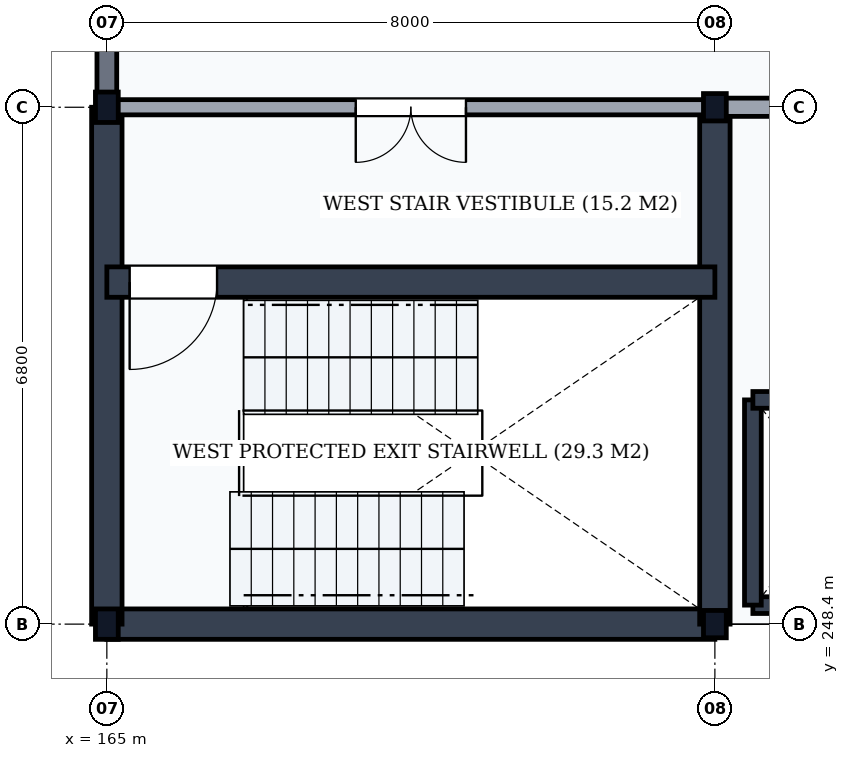
"""IFC4 building model, lengths in metres.
Left out: names, types, materials, properties, quantities, classifications, styles, units other than length and angle.
Written with IfcOpenShell. Run it as: python <this file> out.ifc"""

import sys

from ifc_helpers import new_model, si_unit, direction, frame, frame_2d, origin, origin_2d, place, context, subcontext, project, spatial, rectangle, i_section, extrude, element, fill, save


model = new_model("IFC4")
c1 = context("Model", 3, precision=1e-05, world=origin(), true_north=direction((0.0, 1.0)))
c2 = subcontext(c1, "Body", "Model", "MODEL_VIEW")
j1 = project(units=[si_unit("LENGTHUNIT", "METRE"), si_unit("PLANEANGLEUNIT", "RADIAN")], contexts=[c1])
p1 = place(None, origin())
s1 = spatial("IfcSite", under=j1, at=p1, CompositionType="ELEMENT")
p2 = place(p1, origin())
s2 = spatial("IfcBuilding", under=s1, at=p2, CompositionType="ELEMENT")
p3 = place(p2, frame((0.0, 0.0, 56.1)))
s3 = spatial("IfcBuildingStorey", under=s2, at=p3, CompositionType="ELEMENT", Elevation=56.1)
for number, where, z_axis, x_axis in (
    (1, (165.0, 248.4, 0.0), (0.0, 0.0, 1.0), (1.0, 0.0, 0.0)),
    (2, (165.0, 255.2, 0.0), (0.0, 0.0, 1.0), (1.0, 0.0, 0.0)),
):
    element("IfcColumn", number, at=place(p3, frame(where, z_axis=z_axis, x_axis=x_axis)), inside=s3, PredefinedType="COLUMN", context=c2, shape_type="SweptSolid", body=[
        extrude(i_section(OverallWidth=0.3, OverallDepth=0.4, WebThickness=0.013, FlangeThickness=0.024, FilletRadius=0.027, at=origin_2d()), origin(), (0.0, 0.0, 1.0), 3.9),
    ])
for number, where, z_axis, x_axis in (
    (3, (173.0, 248.4, 0.0), (0.0, 0.0, 1.0), (1.0, 0.0, 0.0)),
    (4, (173.0, 255.2, 0.0), (0.0, 0.0, 1.0), (1.0, 0.0, 0.0)),
):
    element("IfcColumn", number, at=place(p3, frame(where, z_axis=z_axis, x_axis=x_axis)), inside=s3, PredefinedType="COLUMN", context=c2, shape_type="SweptSolid", body=[
        extrude(i_section(OverallWidth=0.3, OverallDepth=0.36, WebThickness=0.012, FlangeThickness=0.022, FilletRadius=0.027, at=origin_2d()), origin(), (0.0, 0.0, 1.0), 3.9),
    ])
p4 = place(p3, frame((165.0, 255.206, 0.0), z_axis=(0.0, 0.0, 1.0), x_axis=(0.0, 1.0, 0.0)))
e5 = element("IfcWall", 5, at=p4, inside=s3, PredefinedType="SOLIDWALL", context=c2, shape_type="SweptSolid", body=[
    extrude(rectangle(XDim=7.588, YDim=0.26, at=frame_2d((3.794, 0.0))), origin(), (0.0, 0.0, 1.0), 3.308),
])
p5 = place(p3, frame((165.0, 248.4, 0.0), z_axis=(0.0, 0.0, 1.0), x_axis=(1.0, 0.0, 0.0)))
e6 = element("IfcWall", 6, at=p5, inside=s3, PredefinedType="SHEAR", context=c2, shape_type="SweptSolid", body=[
    extrude(rectangle(XDim=8.0, YDim=0.4, at=frame_2d((4.0, 0.0))), origin(), (0.0, 0.0, 1.0), 3.58),
])
for number, where, z_axis, x_axis in (
    (7, (165.0, 248.4, 0.0), (0.0, 0.0, 1.0), (0.0, 1.0, 0.0)),
    (8, (173.0, 248.4, 0.0), (0.0, 0.0, 1.0), (0.0, 1.0, 0.0)),
):
    element("IfcWall", number, at=place(p3, frame(where, z_axis=z_axis, x_axis=x_axis)), inside=s3, PredefinedType="SHEAR", context=c2, shape_type="SweptSolid", body=[
        extrude(rectangle(XDim=6.8, YDim=0.4, at=frame_2d((3.4, 0.0))), origin(), (0.0, 0.0, 1.0), 3.58),
    ])
p6 = place(p3, frame((165.0, 252.9, 0.0), z_axis=(0.0, 0.0, 1.0), x_axis=(1.0, 0.0, 0.0)))
e9 = element("IfcWall", 9, at=p6, inside=s3, PredefinedType="SHEAR", context=c2, shape_type="SweptSolid", body=[
    extrude(rectangle(XDim=8.0, YDim=0.4, at=frame_2d((4.0, 0.0))), origin(), (0.0, 0.0, 1.0), 3.58),
])
p7 = place(p6, frame((0.3, 0.0, 0.0)))
e10 = element("IfcOpeningElement", 10, at=p7, cuts=e9, PredefinedType="OPENING", context=c2, shape_type="SweptSolid", body=[
    extrude(rectangle(XDim=1.15, YDim=2.15, at=frame_2d((0.575, 1.075))), frame((0.0, 0.215, 0.0), z_axis=(0.0, -1.0, 0.0), x_axis=(1.0, 0.0, 0.0)), (0.0, 0.0, 1.0), 0.43),
])
p8 = place(p3, frame((165.0, 255.2, 0.0), z_axis=(0.0, 0.0, 1.0), x_axis=(1.0, 0.0, 0.0)))
e11 = element("IfcWall", 11, at=p8, inside=s3, PredefinedType="PARTITIONING", context=c2, shape_type="SweptSolid", body=[
    extrude(rectangle(XDim=8.0, YDim=0.2, at=frame_2d((4.0, 0.0))), origin(), (0.0, 0.0, 1.0), 3.028),
])
p9 = place(p8, frame((3.275, 0.0, 0.0)))
e12 = element("IfcOpeningElement", 12, at=p9, cuts=e11, PredefinedType="OPENING", context=c2, shape_type="SweptSolid", body=[
    extrude(rectangle(XDim=1.45, YDim=2.2, at=frame_2d((0.725, 1.1))), frame((0.0, 0.115, 0.0), z_axis=(0.0, -1.0, 0.0), x_axis=(1.0, 0.0, 0.0)), (0.0, 0.0, 1.0), 0.23),
])
p10 = place(p3, frame((173.5, 248.65, 0.0), z_axis=(0.0, 0.0, 1.0), x_axis=(1.0, 0.0, 0.0)))
e13 = element("IfcWall", 13, at=p10, inside=s3, PredefinedType="SHEAR", context=c2, shape_type="SweptSolid", body=[
    extrude(rectangle(XDim=2.2, YDim=0.22, at=frame_2d((1.1, 0.0))), origin(), (0.0, 0.0, 1.0), 3.58),
])
p11 = place(p3, frame((173.5, 248.65, 0.0), z_axis=(0.0, 0.0, 1.0), x_axis=(0.0, 1.0, 0.0)))
e14 = element("IfcWall", 14, at=p11, inside=s3, PredefinedType="SHEAR", context=c2, shape_type="SweptSolid", body=[
    extrude(rectangle(XDim=2.7, YDim=0.22, at=frame_2d((1.35, 0.0))), origin(), (0.0, 0.0, 1.0), 3.58),
])
p12 = place(p3, frame((173.5, 251.35, 0.0), z_axis=(0.0, 0.0, 1.0), x_axis=(1.0, 0.0, 0.0)))
e15 = element("IfcWall", 15, at=p12, inside=s3, PredefinedType="SHEAR", context=c2, shape_type="SweptSolid", body=[
    extrude(rectangle(XDim=2.2, YDim=0.22, at=frame_2d((1.1, 0.0))), origin(), (0.0, 0.0, 1.0), 3.58),
])
p13 = place(p12, frame((0.55, 0.0, 0.0)))
e16 = element("IfcOpeningElement", 16, at=p13, cuts=e15, PredefinedType="OPENING", context=c2, shape_type="SweptSolid", body=[
    extrude(rectangle(XDim=1.1, YDim=2.15, at=frame_2d((0.55, 1.075))), frame((0.0, 0.125, 0.0), z_axis=(0.0, -1.0, 0.0), x_axis=(1.0, 0.0, 0.0)), (0.0, 0.0, 1.0), 0.25),
])
p14 = place(p3, frame((173.0, 255.2, 0.0), z_axis=(0.0, 0.0, 1.0), x_axis=(1.0, 0.0, 0.0)))
e17 = element("IfcWall", 17, at=p14, inside=s3, PredefinedType="PARTITIONING", context=c2, shape_type="SweptSolid", body=[
    extrude(rectangle(XDim=8.0, YDim=0.24, at=frame_2d((4.0, 0.0))), origin(), (0.0, 0.0, 1.0), 3.028),
])
p15 = place(p14, frame((1.05, 0.0, 0.0)))
e18 = element("IfcOpeningElement", 18, at=p15, cuts=e17, PredefinedType="OPENING", context=c2, shape_type="SweptSolid", body=[
    extrude(rectangle(XDim=1.0, YDim=2.1, at=frame_2d((0.5, 1.05))), frame((0.0, 0.135, 0.0), z_axis=(0.0, -1.0, 0.0), x_axis=(1.0, 0.0, 0.0)), (0.0, 0.0, 1.0), 0.27),
])
p16 = place(p14, frame((4.6, 0.0, 0.0)))
e19 = element("IfcOpeningElement", 19, at=p16, cuts=e17, PredefinedType="OPENING", context=c2, shape_type="SweptSolid", body=[
    extrude(rectangle(XDim=1.6, YDim=2.25, at=frame_2d((0.8, 1.125))), frame((0.0, 0.135, 0.0), z_axis=(0.0, -1.0, 0.0), x_axis=(1.0, 0.0, 0.0)), (0.0, 0.0, 1.0), 0.27),
])
p17 = place(p7, frame((1.15, 0.0, 0.0), z_axis=(0.0, 0.0, 1.0), x_axis=(-1.0, 0.0, 0.0)))
e20 = element("IfcDoor", 20, at=p17, inside=s3, OperationType="SINGLE_SWING_RIGHT", PredefinedType="DOOR", context=c2, shape_type="SweptSolid", body=[
    extrude(rectangle(XDim=1.15, YDim=2.15, at=frame_2d((0.575, 1.075))), frame((0.0, 0.025, 0.0), z_axis=(0.0, -1.0, 0.0), x_axis=(1.0, 0.0, 0.0)), (0.0, 0.0, 1.0), 0.05),
])
fill(e10, e20)
p18 = place(p9, frame((1.45, 0.0, 0.0), z_axis=(0.0, 0.0, 1.0), x_axis=(-1.0, 0.0, 0.0)))
e21 = element("IfcDoor", 21, at=p18, inside=s3, OperationType="DOUBLE_DOOR_SINGLE_SWING", PredefinedType="DOOR", context=c2, shape_type="SweptSolid", body=[
    extrude(rectangle(XDim=1.45, YDim=2.2, at=frame_2d((0.725, 1.1))), frame((0.0, 0.025, 0.0), z_axis=(0.0, -1.0, 0.0), x_axis=(1.0, 0.0, 0.0)), (0.0, 0.0, 1.0), 0.05),
])
fill(e12, e21)
save(model, sys.argv[1])
